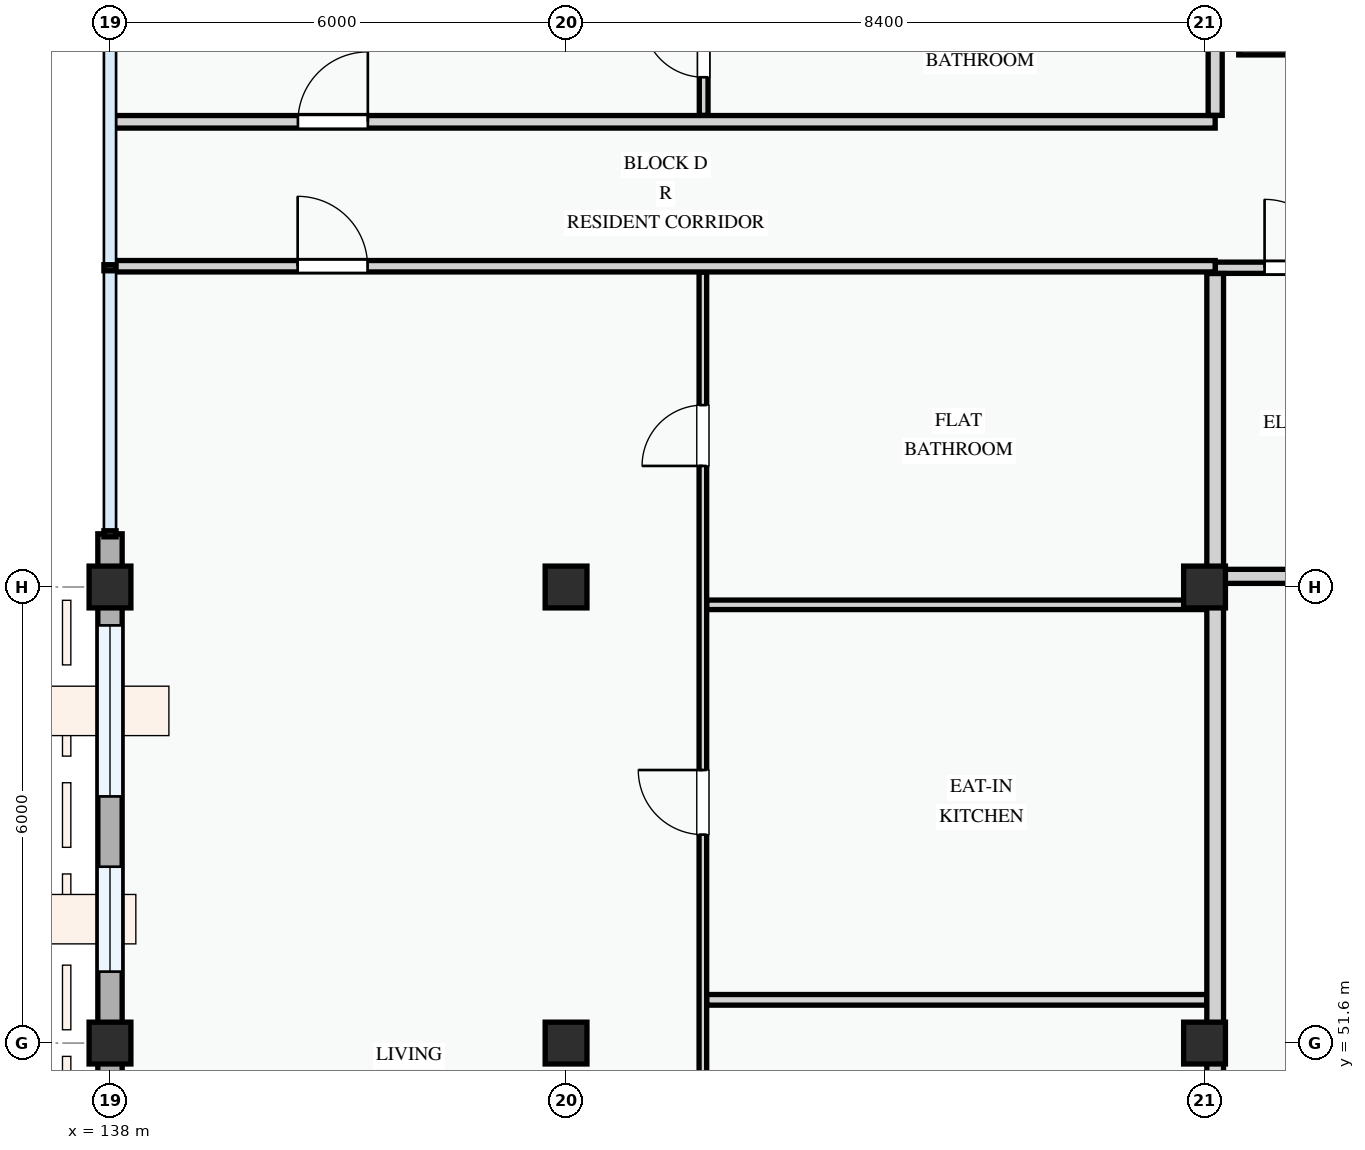
"""IFC4 building model, lengths in metres.
Left out: names, types, materials, properties, quantities, classifications, styles, units other than length and angle.
Written with IfcOpenShell. Run it as: python <this file> out.ifc"""

import sys

from ifc_helpers import new_model, si_unit, direction, frame, frame_2d, origin, origin_2d, place, context, subcontext, project, spatial, rectangle, extrude, element, fill, save


model = new_model("IFC4")
c1 = context("Model", 3, precision=1e-05, world=origin(), true_north=direction((0.0, 1.0)))
c2 = subcontext(c1, "Body", "Model", "MODEL_VIEW")
j1 = project(units=[si_unit("LENGTHUNIT", "METRE"), si_unit("PLANEANGLEUNIT", "RADIAN")], contexts=[c1])
p1 = place(None, origin())
s1 = spatial("IfcSite", under=j1, at=p1, CompositionType="ELEMENT")
p2 = place(p1, origin())
s2 = spatial("IfcBuilding", under=s1, at=p2, CompositionType="ELEMENT")
p3 = place(p2, frame((0.0, 0.0, 11.4)))
s3 = spatial("IfcBuildingStorey", under=s2, at=p3, CompositionType="ELEMENT", Elevation=11.4)
for number, where, z_axis, x_axis in (
    (1, (138.0, 51.6, 0.0), (0.0, 0.0, 1.0), (1.0, 0.0, 0.0)),
    (2, (138.0, 57.6, 0.0), (0.0, 0.0, 1.0), (1.0, 0.0, 0.0)),
    (3, (144.0, 51.6, 0.0), (0.0, 0.0, 1.0), (1.0, 0.0, 0.0)),
    (4, (144.0, 57.6, 0.0), (0.0, 0.0, 1.0), (1.0, 0.0, 0.0)),
    (5, (152.4, 51.6, 0.0), (0.0, 0.0, 1.0), (1.0, 0.0, 0.0)),
    (6, (152.4, 57.6, 0.0), (0.0, 0.0, 1.0), (1.0, 0.0, 0.0)),
):
    element("IfcColumn", number, at=place(p3, frame(where, z_axis=z_axis, x_axis=x_axis)), inside=s3, PredefinedType="COLUMN", context=c2, shape_type="SweptSolid", body=[
        extrude(rectangle(XDim=0.55, YDim=0.55, at=origin_2d()), origin(), (0.0, 0.0, 1.0), 3.3),
    ])
p4 = place(p3, frame((138.0, 58.3, 0.0), z_axis=(0.0, 0.0, 1.0), x_axis=(0.0, -1.0, 0.0)))
e7 = element("IfcWall", 7, at=p4, inside=s3, PredefinedType="STANDARD", context=c2, shape_type="SweptSolid", body=[
    extrude(rectangle(XDim=0.7, YDim=0.32, at=frame_2d((0.35, 0.0))), origin(), (0.0, 0.0, 1.0), 2.425),
])
p5 = place(p3, frame((138.0, 57.6, 0.0), z_axis=(0.0, 0.0, 1.0), x_axis=(0.0, -1.0, 0.0)))
e8 = element("IfcWall", 8, at=p5, inside=s3, PredefinedType="STANDARD", context=c2, shape_type="SweptSolid", body=[
    extrude(rectangle(XDim=6.0, YDim=0.32, at=frame_2d((3.0, 0.0))), origin(), (0.0, 0.0, 1.0), 2.575),
])
p6 = place(p5, frame((0.505, 0.0, 0.78)))
e9 = element("IfcOpeningElement", 9, at=p6, cuts=e8, PredefinedType="OPENING", context=c2, shape_type="SweptSolid", body=[
    extrude(rectangle(XDim=2.25, YDim=1.6, at=frame_2d((1.125, 0.8))), frame((0.0, 0.17, 0.0), z_axis=(0.0, -1.0, 0.0), x_axis=(1.0, 0.0, 0.0)), (0.0, 0.0, 1.0), 0.34),
])
p7 = place(p5, frame((3.68, 0.0, 0.78)))
e10 = element("IfcOpeningElement", 10, at=p7, cuts=e8, PredefinedType="OPENING", context=c2, shape_type="SweptSolid", body=[
    extrude(rectangle(XDim=1.38, YDim=1.48, at=frame_2d((0.69, 0.74))), frame((0.0, 0.17, 0.0), z_axis=(0.0, -1.0, 0.0), x_axis=(1.0, 0.0, 0.0)), (0.0, 0.0, 1.0), 0.34),
])
p8 = place(p3, frame((138.0, 51.6, 0.0), z_axis=(0.0, 0.0, 1.0), x_axis=(0.0, -1.0, 0.0)))
e11 = element("IfcWall", 11, at=p8, inside=s3, PredefinedType="STANDARD", context=c2, shape_type="SweptSolid", body=[
    extrude(rectangle(XDim=8.4, YDim=0.32, at=frame_2d((4.2, 0.0))), origin(), (0.0, 0.0, 1.0), 2.425),
])
p9 = place(p8, frame((1.78, 0.0, 0.78)))
e12 = element("IfcOpeningElement", 12, at=p9, cuts=e11, PredefinedType="OPENING", context=c2, shape_type="SweptSolid", body=[
    extrude(rectangle(XDim=0.9, YDim=1.2, at=frame_2d((0.45, 0.6))), frame((0.0, 0.17, 0.0), z_axis=(0.0, -1.0, 0.0), x_axis=(1.0, 0.0, 0.0)), (0.0, 0.0, 1.0), 0.34),
])
p10 = place(p8, frame((5.42, 0.0, 0.78)))
e13 = element("IfcOpeningElement", 13, at=p10, cuts=e11, PredefinedType="OPENING", context=c2, shape_type="SweptSolid", body=[
    extrude(rectangle(XDim=1.5, YDim=1.5, at=frame_2d((0.75, 0.75))), frame((0.0, 0.17, 0.0), z_axis=(0.0, -1.0, 0.0), x_axis=(1.0, 0.0, 0.0)), (0.0, 0.0, 1.0), 0.34),
])
p11 = place(p3, frame((152.85, 64.725, 0.0), z_axis=(0.0, 0.0, 1.0), x_axis=(1.0, 0.0, 0.0)))
e14 = element("IfcWall", 14, at=p11, inside=s3, PredefinedType="SHEAR", context=c2, shape_type="SweptSolid", body=[
    extrude(rectangle(XDim=13.5, YDim=0.25, at=frame_2d((6.75, 0.0))), origin(), (0.0, 0.0, 1.0), 3.0),
])
p12 = place(p11, frame((6.2, 0.0, 0.0)))
e15 = element("IfcOpeningElement", 15, at=p12, cuts=e14, PredefinedType="OPENING", context=c2, shape_type="SweptSolid", body=[
    extrude(rectangle(XDim=1.1, YDim=2.15, at=frame_2d((0.55, 1.075))), frame((0.0, 0.135, 0.0), z_axis=(0.0, -1.0, 0.0), x_axis=(1.0, 0.0, 0.0)), (0.0, 0.0, 1.0), 0.27),
])
p13 = place(p3, frame((152.54, 61.8, 0.0), z_axis=(0.0, 0.0, 1.0), x_axis=(1.0, 0.0, 0.0)))
e16 = element("IfcWall", 16, at=p13, inside=s3, PredefinedType="PARTITIONING", context=c2, shape_type="SweptSolid", body=[
    extrude(rectangle(XDim=7.435, YDim=0.148, at=frame_2d((3.718, 0.0))), origin(), (0.0, 0.0, 1.0), 3.0),
])
p14 = place(p13, frame((0.65, 0.0, 0.0)))
e17 = element("IfcOpeningElement", 17, at=p14, cuts=e16, PredefinedType="OPENING", context=c2, shape_type="SweptSolid", body=[
    extrude(rectangle(XDim=0.9, YDim=2.1, at=frame_2d((0.45, 1.05))), frame((0.0, 0.084, 0.0), z_axis=(0.0, -1.0, 0.0), x_axis=(1.0, 0.0, 0.0)), (0.0, 0.0, 1.0), 0.168),
])
p15 = place(p13, frame((4.2, 0.0, 0.0)))
e18 = element("IfcOpeningElement", 18, at=p15, cuts=e16, PredefinedType="OPENING", context=c2, shape_type="SweptSolid", body=[
    extrude(rectangle(XDim=0.95, YDim=2.1, at=frame_2d((0.475, 1.05))), frame((0.0, 0.084, 0.0), z_axis=(0.0, -1.0, 0.0), x_axis=(1.0, 0.0, 0.0)), (0.0, 0.0, 1.0), 0.168),
])
p16 = place(p3, frame((152.652, 57.74, 0.0), z_axis=(0.0, 0.0, 1.0), x_axis=(1.0, 0.0, 0.0)))
e19 = element("IfcWall", 19, at=p16, inside=s3, PredefinedType="PARTITIONING", context=c2, shape_type="SweptSolid", body=[
    extrude(rectangle(XDim=7.344, YDim=0.185, at=frame_2d((3.672, 0.0))), origin(), (0.0, 0.0, 1.0), 2.375),
])
p17 = place(p3, frame((145.8, 43.362, 0.0), z_axis=(0.0, 0.0, 1.0), x_axis=(0.0, 1.0, 0.0)))
e20 = element("IfcWall", 20, at=p17, inside=s3, PredefinedType="PARTITIONING", context=c2, shape_type="SweptSolid", body=[
    extrude(rectangle(XDim=18.381, YDim=0.1, at=frame_2d((9.19, 0.0))), origin(), (0.0, 0.0, 1.0), 3.0),
])
p18 = place(p17, frame((3.927, 0.0, 0.0)))
e21 = element("IfcOpeningElement", 21, at=p18, cuts=e20, PredefinedType="OPENING", context=c2, shape_type="SweptSolid", body=[
    extrude(rectangle(XDim=0.85, YDim=2.1, at=frame_2d((0.425, 1.05))), frame((0.0, 0.06, 0.0), z_axis=(0.0, -1.0, 0.0), x_axis=(1.0, 0.0, 0.0)), (0.0, 0.0, 1.0), 0.12),
])
p19 = place(p17, frame((10.98, 0.0, 0.0)))
e22 = element("IfcOpeningElement", 22, at=p19, cuts=e20, PredefinedType="OPENING", context=c2, shape_type="SweptSolid", body=[
    extrude(rectangle(XDim=0.85, YDim=2.1, at=frame_2d((0.425, 1.05))), frame((0.0, 0.06, 0.0), z_axis=(0.0, -1.0, 0.0), x_axis=(1.0, 0.0, 0.0)), (0.0, 0.0, 1.0), 0.12),
])
p20 = place(p17, frame((15.831, 0.0, 0.0)))
e23 = element("IfcOpeningElement", 23, at=p20, cuts=e20, PredefinedType="OPENING", context=c2, shape_type="SweptSolid", body=[
    extrude(rectangle(XDim=0.8, YDim=2.1, at=frame_2d((0.4, 1.05))), frame((0.0, 0.06, 0.0), z_axis=(0.0, -1.0, 0.0), x_axis=(1.0, 0.0, 0.0)), (0.0, 0.0, 1.0), 0.12),
])
p21 = place(p3, frame((145.852, 52.169, 0.0), z_axis=(0.0, 0.0, 1.0), x_axis=(1.0, 0.0, 0.0)))
e24 = element("IfcWall", 24, at=p21, inside=s3, PredefinedType="PARTITIONING", context=c2, shape_type="SweptSolid", body=[
    extrude(rectangle(XDim=6.576, YDim=0.14, at=frame_2d((3.288, 0.0))), origin(), (0.0, 0.0, 1.0), 3.0),
])
p22 = place(p3, frame((145.852, 57.365, 0.0), z_axis=(0.0, 0.0, 1.0), x_axis=(1.0, 0.0, 0.0)))
e25 = element("IfcWall", 25, at=p22, inside=s3, PredefinedType="PARTITIONING", context=c2, shape_type="SweptSolid", body=[
    extrude(rectangle(XDim=6.576, YDim=0.125, at=frame_2d((3.288, 0.0))), origin(), (0.0, 0.0, 1.0), 2.375),
])
p23 = place(p3, frame((145.81, 63.804, 0.0), z_axis=(0.0, 0.0, 1.0), x_axis=(0.0, 1.0, 0.0)))
e26 = element("IfcWall", 26, at=p23, inside=s3, PredefinedType="PARTITIONING", context=c2, shape_type="SweptSolid", body=[
    extrude(rectangle(XDim=8.033, YDim=0.115, at=frame_2d((4.017, 0.0))), origin(), (0.0, 0.0, 1.0), 3.0),
])
p24 = place(p23, frame((0.502, 0.0, 0.0)))
e27 = element("IfcOpeningElement", 27, at=p24, cuts=e26, PredefinedType="OPENING", context=c2, shape_type="SweptSolid", body=[
    extrude(rectangle(XDim=0.8, YDim=2.1, at=frame_2d((0.4, 1.05))), frame((0.0, 0.067, 0.0), z_axis=(0.0, -1.0, 0.0), x_axis=(1.0, 0.0, 0.0)), (0.0, 0.0, 1.0), 0.135),
])
p25 = place(p23, frame((2.614, 0.0, 0.0)))
e28 = element("IfcOpeningElement", 28, at=p25, cuts=e26, PredefinedType="OPENING", context=c2, shape_type="SweptSolid", body=[
    extrude(rectangle(XDim=0.85, YDim=2.1, at=frame_2d((0.425, 1.05))), frame((0.0, 0.067, 0.0), z_axis=(0.0, -1.0, 0.0), x_axis=(1.0, 0.0, 0.0)), (0.0, 0.0, 1.0), 0.135),
])
p26 = place(p23, frame((5.738, 0.0, 0.0)))
e29 = element("IfcOpeningElement", 29, at=p26, cuts=e26, PredefinedType="OPENING", context=c2, shape_type="SweptSolid", body=[
    extrude(rectangle(XDim=0.85, YDim=2.1, at=frame_2d((0.425, 1.05))), frame((0.0, 0.067, 0.0), z_axis=(0.0, -1.0, 0.0), x_axis=(1.0, 0.0, 0.0)), (0.0, 0.0, 1.0), 0.135),
])
p27 = place(p3, frame((152.54, 43.26, 0.0), z_axis=(0.0, 0.0, 1.0), x_axis=(0.0, 1.0, 0.0)))
e30 = element("IfcWall", 30, at=p27, inside=s3, PredefinedType="PARTITIONING", context=c2, shape_type="SweptSolid", body=[
    extrude(rectangle(XDim=18.464, YDim=0.22, at=frame_2d((9.232, 0.0))), origin(), (0.0, 0.0, 1.0), 2.425),
])
p28 = place(p3, frame((152.54, 63.804, 0.0), z_axis=(0.0, 0.0, 1.0), x_axis=(0.0, 1.0, 0.0)))
e31 = element("IfcWall", 31, at=p28, inside=s3, PredefinedType="PARTITIONING", context=c2, shape_type="SweptSolid", body=[
    extrude(rectangle(XDim=8.033, YDim=0.185, at=frame_2d((4.017, 0.0))), origin(), (0.0, 0.0, 1.0), 2.425),
])
p29 = place(p3, frame((138.06, 61.82, 0.0), z_axis=(0.0, 0.0, 1.0), x_axis=(1.0, 0.0, 0.0)))
e32 = element("IfcWall", 32, at=p29, inside=s3, PredefinedType="PARTITIONING", context=c2, shape_type="SweptSolid", body=[
    extrude(rectangle(XDim=14.48, YDim=0.15, at=frame_2d((7.24, 0.0))), origin(), (0.0, 0.0, 1.0), 3.0),
])
p30 = place(p29, frame((2.409, 0.0, 0.0)))
e33 = element("IfcOpeningElement", 33, at=p30, cuts=e32, PredefinedType="OPENING", context=c2, shape_type="SweptSolid", body=[
    extrude(rectangle(XDim=0.92, YDim=2.1, at=frame_2d((0.46, 1.05))), frame((0.0, 0.085, 0.0), z_axis=(0.0, -1.0, 0.0), x_axis=(1.0, 0.0, 0.0)), (0.0, 0.0, 1.0), 0.17),
])
p31 = place(p3, frame((138.06, 63.72, 0.0), z_axis=(0.0, 0.0, 1.0), x_axis=(1.0, 0.0, 0.0)))
e34 = element("IfcWall", 34, at=p31, inside=s3, PredefinedType="PARTITIONING", context=c2, shape_type="SweptSolid", body=[
    extrude(rectangle(XDim=14.48, YDim=0.165, at=frame_2d((7.24, 0.0))), origin(), (0.0, 0.0, 1.0), 3.0),
])
p32 = place(p31, frame((2.412, 0.0, 0.0)))
e35 = element("IfcOpeningElement", 35, at=p32, cuts=e34, PredefinedType="OPENING", context=c2, shape_type="SweptSolid", body=[
    extrude(rectangle(XDim=0.92, YDim=2.1, at=frame_2d((0.46, 1.05))), frame((0.0, 0.093, 0.0), z_axis=(0.0, -1.0, 0.0), x_axis=(1.0, 0.0, 0.0)), (0.0, 0.0, 1.0), 0.185),
])
p33 = place(p6, origin())
e36 = element("IfcWindow", 36, at=p33, inside=s3, PartitioningType="DOUBLE_PANEL_VERTICAL", PredefinedType="WINDOW", context=c2, shape_type="SweptSolid", body=[
    extrude(rectangle(XDim=2.25, YDim=1.6, at=frame_2d((1.125, 0.8))), frame((0.0, 0.03, 0.0), z_axis=(0.0, -1.0, 0.0), x_axis=(1.0, 0.0, 0.0)), (0.0, 0.0, 1.0), 0.06),
])
fill(e9, e36)
p34 = place(p7, origin())
e37 = element("IfcWindow", 37, at=p34, inside=s3, PartitioningType="SINGLE_PANEL", PredefinedType="WINDOW", context=c2, shape_type="SweptSolid", body=[
    extrude(rectangle(XDim=1.38, YDim=1.48, at=frame_2d((0.69, 0.74))), frame((0.0, 0.03, 0.0), z_axis=(0.0, -1.0, 0.0), x_axis=(1.0, 0.0, 0.0)), (0.0, 0.0, 1.0), 0.06),
])
fill(e10, e37)
p35 = place(p14, origin())
e38 = element("IfcDoor", 38, at=p35, inside=s3, OperationType="SINGLE_SWING_LEFT", PredefinedType="DOOR", context=c2, shape_type="SweptSolid", body=[
    extrude(rectangle(XDim=0.9, YDim=2.1, at=frame_2d((0.45, 1.05))), frame((0.0, 0.025, 0.0), z_axis=(0.0, -1.0, 0.0), x_axis=(1.0, 0.0, 0.0)), (0.0, 0.0, 1.0), 0.05),
])
fill(e17, e38)
p36 = place(p19, origin())
e39 = element("IfcDoor", 39, at=p36, inside=s3, OperationType="SINGLE_SWING_RIGHT", PredefinedType="DOOR", context=c2, shape_type="SweptSolid", body=[
    extrude(rectangle(XDim=0.85, YDim=2.1, at=frame_2d((0.425, 1.05))), frame((0.0, 0.025, 0.0), z_axis=(0.0, -1.0, 0.0), x_axis=(1.0, 0.0, 0.0)), (0.0, 0.0, 1.0), 0.05),
])
fill(e22, e39)
p37 = place(p20, origin())
e40 = element("IfcDoor", 40, at=p37, inside=s3, OperationType="SINGLE_SWING_LEFT", PredefinedType="DOOR", context=c2, shape_type="SweptSolid", body=[
    extrude(rectangle(XDim=0.8, YDim=2.1, at=frame_2d((0.4, 1.05))), frame((0.0, 0.025, 0.0), z_axis=(0.0, -1.0, 0.0), x_axis=(1.0, 0.0, 0.0)), (0.0, 0.0, 1.0), 0.05),
])
fill(e23, e40)
p38 = place(p24, origin())
e41 = element("IfcDoor", 41, at=p38, inside=s3, OperationType="SINGLE_SWING_RIGHT", PredefinedType="DOOR", context=c2, shape_type="SweptSolid", body=[
    extrude(rectangle(XDim=0.8, YDim=2.1, at=frame_2d((0.4, 1.05))), frame((0.0, 0.025, 0.0), z_axis=(0.0, -1.0, 0.0), x_axis=(1.0, 0.0, 0.0)), (0.0, 0.0, 1.0), 0.05),
])
fill(e27, e41)
p39 = place(p30, origin())
e42 = element("IfcDoor", 42, at=p39, inside=s3, OperationType="SINGLE_SWING_LEFT", PredefinedType="DOOR", context=c2, shape_type="SweptSolid", body=[
    extrude(rectangle(XDim=0.92, YDim=2.1, at=frame_2d((0.46, 1.05))), frame((0.0, 0.025, 0.0), z_axis=(0.0, -1.0, 0.0), x_axis=(1.0, 0.0, 0.0)), (0.0, 0.0, 1.0), 0.05),
])
fill(e33, e42)
p40 = place(p32, origin())
e43 = element("IfcDoor", 43, at=p40, inside=s3, OperationType="SINGLE_SWING_RIGHT", PredefinedType="DOOR", context=c2, shape_type="SweptSolid", body=[
    extrude(rectangle(XDim=0.92, YDim=2.1, at=frame_2d((0.46, 1.05))), frame((0.0, 0.025, 0.0), z_axis=(0.0, -1.0, 0.0), x_axis=(1.0, 0.0, 0.0)), (0.0, 0.0, 1.0), 0.05),
])
fill(e35, e43)
save(model, sys.argv[1])
